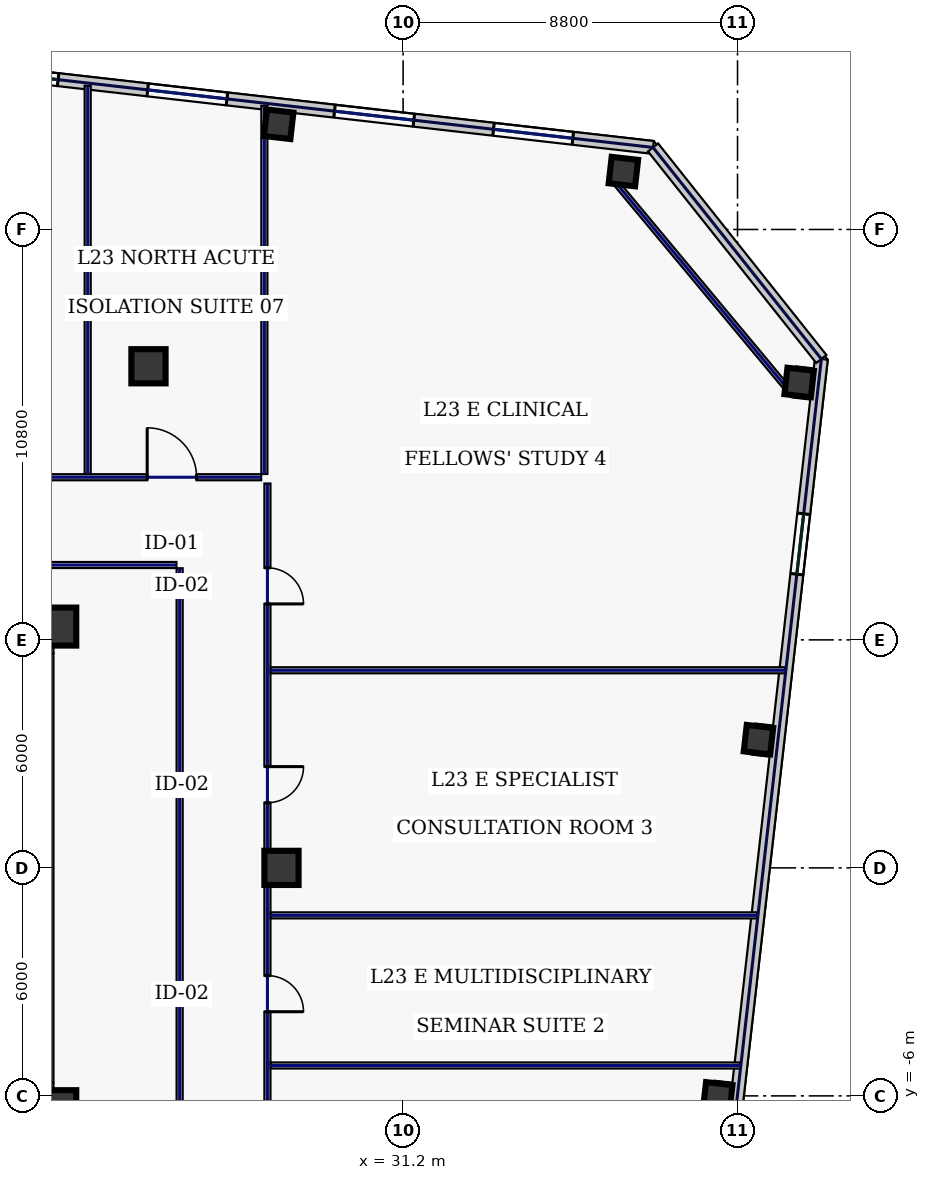
"""IFC4 building model, lengths in metres.
Left out: names, types, materials, properties, quantities, classifications, styles, units other than length and angle.
Written with IfcOpenShell. Run it as: python <this file> out.ifc"""

import sys

from ifc_helpers import new_model, si_unit, direction, frame, frame_2d, origin, origin_2d, place, context, subcontext, project, spatial, rectangle, hollow_rectangle, extrude, element, fill, save


model = new_model("IFC4")
c1 = context("Model", 3, precision=1e-05, world=origin(), true_north=direction((0.0, 1.0)))
c2 = subcontext(c1, "Body", "Model", "MODEL_VIEW")
j1 = project(units=[si_unit("LENGTHUNIT", "METRE"), si_unit("PLANEANGLEUNIT", "RADIAN")], contexts=[c1])
p1 = place(None, origin())
s1 = spatial("IfcSite", under=j1, at=p1, CompositionType="ELEMENT")
p2 = place(p1, origin())
s2 = spatial("IfcBuilding", under=s1, at=p2, CompositionType="ELEMENT")
p3 = place(p2, frame((0.0, 0.0, 105.4)))
s3 = spatial("IfcBuildingStorey", under=s2, at=p3, CompositionType="ELEMENT", Elevation=105.4)
for number, where, z_axis, x_axis in (
    (1, (10.45, 6.0, 0.0), (0.0, 0.0, 1.0), (1.0, 0.0, 0.0)),
    (2, (10.45, -6.0, 0.0), (0.0, 0.0, 1.0), (1.0, 0.0, 0.0)),
):
    element("IfcWall", number, at=place(p3, frame(where, z_axis=z_axis, x_axis=x_axis)), inside=s3, PredefinedType="SHEAR", context=c2, shape_type="SweptSolid", body=[
        extrude(rectangle(XDim=11.55, YDim=0.7, at=frame_2d((5.775, 0.0))), origin(), (0.0, 0.0, 1.0), 3.74),
    ])
p4 = place(p3, frame((21.6, -5.65, 0.0), z_axis=(0.0, 0.0, 1.0), x_axis=(0.0, 1.0, 0.0)))
e3 = element("IfcWall", 3, at=p4, inside=s3, PredefinedType="SHEAR", context=c2, shape_type="SweptSolid", body=[
    extrude(rectangle(XDim=11.3, YDim=0.8, at=frame_2d((5.65, 0.0))), origin(), (0.0, 0.0, 1.0), 3.74),
])
for number, where, z_axis, x_axis in (
    (4, (22.1, -6.35, 0.0), (0.0, 0.0, 1.0), (1.0, 0.0, 0.0)),
    (5, (22.1, 6.35, 0.0), (0.0, 0.0, 1.0), (1.0, 0.0, 0.0)),
):
    element("IfcColumn", number, at=place(p3, frame(where, z_axis=z_axis, x_axis=x_axis)), inside=s3, PredefinedType="COLUMN", context=c2, shape_type="SweptSolid", body=[
        extrude(hollow_rectangle(XDim=1.0, YDim=1.0, WallThickness=0.045, at=origin_2d()), origin(), (0.0, 0.0, 1.0), 3.74),
    ])
for number, where, z_axis, x_axis in (
    (6, (24.5, 13.2, 0.0), (0.0, 0.0, 1.0), (1.0, 0.0, 0.0)),
    (7, (28.0, 0.0, 0.0), (0.0, 0.0, 1.0), (1.0, 0.0, 0.0)),
):
    element("IfcColumn", number, at=place(p3, frame(where, z_axis=z_axis, x_axis=x_axis)), inside=s3, PredefinedType="COLUMN", context=c2, shape_type="SweptSolid", body=[
        extrude(hollow_rectangle(XDim=0.9, YDim=0.9, WallThickness=0.04, at=origin_2d()), origin(), (0.0, 0.0, 1.0), 3.74),
    ])
for number, where, z_axis, x_axis in (
    (8, (36.997, 18.323, 0.0), (0.0, 0.0, 1.0), (0.994, -0.113, 0.0)),
    (9, (27.926, 19.568, 0.0), (0.0, 0.0, 1.0), (0.994, -0.113, 0.0)),
    (10, (39.48, -6.025, 0.0), (0.0, 0.0, 1.0), (0.994, -0.113, 0.0)),
    (11, (40.551, 3.375, 0.0), (0.0, 0.0, 1.0), (0.994, -0.113, 0.0)),
    (12, (41.622, 12.774, 0.0), (0.0, 0.0, 1.0), (0.994, -0.113, 0.0)),
):
    element("IfcColumn", number, at=place(p3, frame(where, z_axis=z_axis, x_axis=x_axis)), inside=s3, PredefinedType="COLUMN", context=c2, shape_type="SweptSolid", body=[
        extrude(hollow_rectangle(XDim=0.7, YDim=0.7, WallThickness=0.032, at=origin_2d()), origin(), (0.0, 0.0, 1.0), 3.74),
    ])
p5 = place(p3, frame((37.777, 18.958, 0.0), z_axis=(0.0, 0.0, 1.0), x_axis=(-0.993571362037, 0.113207546299, 0.0)))
e13 = element("IfcWall", 13, at=p5, inside=s3, PredefinedType="STANDARD", context=c2, shape_type="SweptSolid", body=[
    extrude(rectangle(XDim=21.223, YDim=0.34, at=frame_2d((10.611, 0.0))), origin(), (0.0, 0.0, 1.0), 3.74),
])
p6 = place(p5, frame((15.756, 0.0, 0.22)))
e14 = element("IfcOpeningElement", 14, at=p6, cuts=e13, PredefinedType="OPENING", context=c2, shape_type="SweptSolid", body=[
    extrude(rectangle(XDim=1.6, YDim=1.2, at=frame_2d((0.8, 0.6))), frame((0.0, 0.18, 0.0), z_axis=(0.0, -1.0, 0.0), x_axis=(1.0, 0.0, 0.0)), (0.0, 0.0, 1.0), 0.36),
])
p7 = place(p5, frame((11.285, 0.0, 0.67)))
e15 = element("IfcOpeningElement", 15, at=p7, cuts=e13, PredefinedType="OPENING", context=c2, shape_type="SweptSolid", body=[
    extrude(rectangle(XDim=2.1, YDim=2.2, at=frame_2d((1.05, 1.1))), frame((0.0, 0.18, 0.0), z_axis=(0.0, -1.0, 0.0), x_axis=(1.0, 0.0, 0.0)), (0.0, 0.0, 1.0), 0.36),
])
p8 = place(p5, frame((6.336, 0.0, 0.67)))
e16 = element("IfcOpeningElement", 16, at=p8, cuts=e13, PredefinedType="OPENING", context=c2, shape_type="SweptSolid", body=[
    extrude(rectangle(XDim=2.1, YDim=2.2, at=frame_2d((1.05, 1.1))), frame((0.0, 0.18, 0.0), z_axis=(0.0, -1.0, 0.0), x_axis=(1.0, 0.0, 0.0)), (0.0, 0.0, 1.0), 0.36),
])
p9 = place(p5, frame((2.125, 0.0, 0.67)))
e17 = element("IfcOpeningElement", 17, at=p9, cuts=e13, PredefinedType="OPENING", context=c2, shape_type="SweptSolid", body=[
    extrude(rectangle(XDim=2.1, YDim=2.2, at=frame_2d((1.05, 1.1))), frame((0.0, 0.18, 0.0), z_axis=(0.0, -1.0, 0.0), x_axis=(1.0, 0.0, 0.0)), (0.0, 0.0, 1.0), 0.36),
])
p10 = place(p3, frame((37.768, -25.556, 0.0), z_axis=(0.0, 0.0, 1.0), x_axis=(0.113201605824, 0.993572038877, 0.0)))
e18 = element("IfcWall", 18, at=p10, inside=s3, PredefinedType="STANDARD", context=c2, shape_type="SweptSolid", body=[
    extrude(rectangle(XDim=39.2, YDim=0.34, at=frame_2d((19.6, 0.0))), origin(), (0.0, 0.0, 1.0), 3.74),
])
p11 = place(p10, frame((4.1, 0.0, 0.58)))
e19 = element("IfcOpeningElement", 19, at=p11, cuts=e18, PredefinedType="OPENING", context=c2, shape_type="SweptSolid", body=[
    extrude(rectangle(XDim=1.6, YDim=2.3, at=frame_2d((0.8, 1.15))), frame((0.0, 0.18, 0.0), z_axis=(0.0, -1.0, 0.0), x_axis=(1.0, 0.0, 0.0)), (0.0, 0.0, 1.0), 0.36),
])
p12 = place(p10, frame((13.9, 0.0, 0.58)))
e20 = element("IfcOpeningElement", 20, at=p12, cuts=e18, PredefinedType="OPENING", context=c2, shape_type="SweptSolid", body=[
    extrude(rectangle(XDim=1.6, YDim=2.3, at=frame_2d((0.8, 1.15))), frame((0.0, 0.18, 0.0), z_axis=(0.0, -1.0, 0.0), x_axis=(1.0, 0.0, 0.0)), (0.0, 0.0, 1.0), 0.36),
])
p13 = place(p10, frame((33.5, 0.0, 0.58)))
e21 = element("IfcOpeningElement", 21, at=p13, cuts=e18, PredefinedType="OPENING", context=c2, shape_type="SweptSolid", body=[
    extrude(rectangle(XDim=1.6, YDim=2.3, at=frame_2d((0.8, 1.15))), frame((0.0, 0.18, 0.0), z_axis=(0.0, -1.0, 0.0), x_axis=(1.0, 0.0, 0.0)), (0.0, 0.0, 1.0), 0.36),
])
p14 = place(p3, frame((42.206, 13.392, 0.0), z_axis=(0.0, 0.0, 1.0), x_axis=(-0.622524521309, 0.782600294128, 0.0)))
e22 = element("IfcWall", 22, at=p14, inside=s3, PredefinedType="STANDARD", context=c2, shape_type="SweptSolid", body=[
    extrude(rectangle(XDim=7.113, YDim=0.34, at=frame_2d((3.557, 0.0))), origin(), (0.0, 0.0, 1.0), 3.74),
])
p15 = place(p3, frame((41.361, 12.556, 0.0), z_axis=(0.0, 0.0, 1.0), x_axis=(-0.640217638562, 0.768193579298, 0.0)))
e23 = element("IfcWall", 23, at=p15, inside=s3, PredefinedType="PARTITIONING", context=c2, shape_type="SweptSolid", body=[
    extrude(rectangle(XDim=7.224, YDim=0.16, at=frame_2d((3.612, 0.0))), origin(), (0.0, 0.0, 1.0), 3.74),
])
p16 = place(p3, frame((-27.465, 10.28, 0.0), z_axis=(0.0, 0.0, 1.0), x_axis=(1.0, 0.0, 0.0)))
e24 = element("IfcWall", 24, at=p16, inside=s3, PredefinedType="PARTITIONING", context=c2, shape_type="SweptSolid", body=[
    extrude(rectangle(XDim=54.93, YDim=0.16, at=frame_2d((27.465, 0.0))), origin(), (0.0, 0.0, 1.0), 3.74),
])
p17 = place(p16, frame((2.044, 0.0, 0.0)))
e25 = element("IfcOpeningElement", 25, at=p17, cuts=e24, PredefinedType="OPENING", context=c2, shape_type="SweptSolid", body=[
    extrude(rectangle(XDim=0.95, YDim=2.2, at=frame_2d((0.475, 1.1))), frame((0.0, 0.09, 0.0), z_axis=(0.0, -1.0, 0.0), x_axis=(1.0, 0.0, 0.0)), (0.0, 0.0, 1.0), 0.18),
])
p18 = place(p16, frame((8.045, 0.0, 0.0)))
e26 = element("IfcOpeningElement", 26, at=p18, cuts=e24, PredefinedType="OPENING", context=c2, shape_type="SweptSolid", body=[
    extrude(rectangle(XDim=1.05, YDim=2.2, at=frame_2d((0.525, 1.1))), frame((0.0, 0.09, 0.0), z_axis=(0.0, -1.0, 0.0), x_axis=(1.0, 0.0, 0.0)), (0.0, 0.0, 1.0), 0.18),
])
p19 = place(p16, frame((16.995, 0.0, 0.0)))
e27 = element("IfcOpeningElement", 27, at=p19, cuts=e24, PredefinedType="OPENING", context=c2, shape_type="SweptSolid", body=[
    extrude(rectangle(XDim=0.95, YDim=2.2, at=frame_2d((0.475, 1.1))), frame((0.0, 0.09, 0.0), z_axis=(0.0, -1.0, 0.0), x_axis=(1.0, 0.0, 0.0)), (0.0, 0.0, 1.0), 0.18),
])
p20 = place(p16, frame((27.6, 0.0, 0.0)))
e28 = element("IfcOpeningElement", 28, at=p20, cuts=e24, PredefinedType="OPENING", context=c2, shape_type="SweptSolid", body=[
    extrude(rectangle(XDim=1.3, YDim=2.2, at=frame_2d((0.65, 1.1))), frame((0.0, 0.09, 0.0), z_axis=(0.0, -1.0, 0.0), x_axis=(1.0, 0.0, 0.0)), (0.0, 0.0, 1.0), 0.18),
])
p21 = place(p16, frame((38.575, 0.0, 0.0)))
e29 = element("IfcOpeningElement", 29, at=p21, cuts=e24, PredefinedType="OPENING", context=c2, shape_type="SweptSolid", body=[
    extrude(rectangle(XDim=0.95, YDim=2.2, at=frame_2d((0.475, 1.1))), frame((0.0, 0.09, 0.0), z_axis=(0.0, -1.0, 0.0), x_axis=(1.0, 0.0, 0.0)), (0.0, 0.0, 1.0), 0.18),
])
p22 = place(p16, frame((46.825, 0.0, 0.0)))
e30 = element("IfcOpeningElement", 30, at=p22, cuts=e24, PredefinedType="OPENING", context=c2, shape_type="SweptSolid", body=[
    extrude(rectangle(XDim=0.95, YDim=2.2, at=frame_2d((0.475, 1.1))), frame((0.0, 0.09, 0.0), z_axis=(0.0, -1.0, 0.0), x_axis=(1.0, 0.0, 0.0)), (0.0, 0.0, 1.0), 0.18),
])
p23 = place(p16, frame((51.931, 0.0, 0.0)))
e31 = element("IfcOpeningElement", 31, at=p23, cuts=e24, PredefinedType="OPENING", context=c2, shape_type="SweptSolid", body=[
    extrude(rectangle(XDim=1.3, YDim=2.2, at=frame_2d((0.65, 1.1))), frame((0.0, 0.09, 0.0), z_axis=(0.0, -1.0, 0.0), x_axis=(1.0, 0.0, 0.0)), (0.0, 0.0, 1.0), 0.18),
])
p24 = place(p3, frame((27.63, 10.115, 0.0), z_axis=(0.0, 0.0, 1.0), x_axis=(0.0, -1.0, 0.0)))
e32 = element("IfcWall", 32, at=p24, inside=s3, PredefinedType="PARTITIONING", context=c2, shape_type="SweptSolid", body=[
    extrude(rectangle(XDim=20.13, YDim=0.16, at=frame_2d((10.065, 0.0))), origin(), (0.0, 0.0, 1.0), 3.74),
])
p25 = place(p24, frame((17.181, 0.0, 0.0)))
e33 = element("IfcOpeningElement", 33, at=p25, cuts=e32, PredefinedType="OPENING", context=c2, shape_type="SweptSolid", body=[
    extrude(rectangle(XDim=0.95, YDim=2.2, at=frame_2d((0.475, 1.1))), frame((0.0, 0.09, 0.0), z_axis=(0.0, -1.0, 0.0), x_axis=(1.0, 0.0, 0.0)), (0.0, 0.0, 1.0), 0.18),
])
p26 = place(p24, frame((12.95, 0.0, 0.0)))
e34 = element("IfcOpeningElement", 34, at=p26, cuts=e32, PredefinedType="OPENING", context=c2, shape_type="SweptSolid", body=[
    extrude(rectangle(XDim=0.95, YDim=2.2, at=frame_2d((0.475, 1.1))), frame((0.0, 0.09, 0.0), z_axis=(0.0, -1.0, 0.0), x_axis=(1.0, 0.0, 0.0)), (0.0, 0.0, 1.0), 0.18),
])
p27 = place(p24, frame((7.45, 0.0, 0.0)))
e35 = element("IfcOpeningElement", 35, at=p27, cuts=e32, PredefinedType="OPENING", context=c2, shape_type="SweptSolid", body=[
    extrude(rectangle(XDim=0.95, YDim=2.2, at=frame_2d((0.475, 1.1))), frame((0.0, 0.09, 0.0), z_axis=(0.0, -1.0, 0.0), x_axis=(1.0, 0.0, 0.0)), (0.0, 0.0, 1.0), 0.18),
])
p28 = place(p24, frame((2.219, 0.0, 0.0)))
e36 = element("IfcOpeningElement", 36, at=p28, cuts=e32, PredefinedType="OPENING", context=c2, shape_type="SweptSolid", body=[
    extrude(rectangle(XDim=0.95, YDim=2.2, at=frame_2d((0.475, 1.1))), frame((0.0, 0.09, 0.0), z_axis=(0.0, -1.0, 0.0), x_axis=(1.0, 0.0, 0.0)), (0.0, 0.0, 1.0), 0.18),
])
p29 = place(p3, frame((25.235, 7.97, 0.0), z_axis=(0.0, 0.0, 1.0), x_axis=(-1.0, 0.0, 0.0)))
e37 = element("IfcWall", 37, at=p29, inside=s3, PredefinedType="PARTITIONING", context=c2, shape_type="SweptSolid", body=[
    extrude(rectangle(XDim=14.57, YDim=0.16, at=frame_2d((7.285, 0.0))), origin(), (0.0, 0.0, 1.0), 3.74),
])
p30 = place(p3, frame((25.32, -7.785, 0.0), z_axis=(0.0, 0.0, 1.0), x_axis=(0.0, 1.0, 0.0)))
e38 = element("IfcWall", 38, at=p30, inside=s3, PredefinedType="PARTITIONING", context=c2, shape_type="SweptSolid", body=[
    extrude(rectangle(XDim=15.67, YDim=0.16, at=frame_2d((7.835, 0.0))), origin(), (0.0, 0.0, 1.0), 3.74),
])
p31 = place(p3, frame((27.55, 10.365, 0.0), z_axis=(0.0, 0.0, 1.0), x_axis=(0.0, 1.0, 0.0)))
e39 = element("IfcWall", 39, at=p31, inside=s3, PredefinedType="PARTITIONING", context=c2, shape_type="SweptSolid", body=[
    extrude(rectangle(XDim=9.688, YDim=0.16, at=frame_2d((4.844, 0.0))), origin(), (0.0, 0.0, 1.0), 3.74),
])
p32 = place(p3, frame((22.9, 10.365, 0.0), z_axis=(0.0, 0.0, 1.0), x_axis=(0.0, 1.0, 0.0)))
e40 = element("IfcWall", 40, at=p32, inside=s3, PredefinedType="PARTITIONING", context=c2, shape_type="SweptSolid", body=[
    extrude(rectangle(XDim=10.218, YDim=0.16, at=frame_2d((5.109, 0.0))), origin(), (0.0, 0.0, 1.0), 3.74),
])
p33 = place(p3, frame((27.715, -5.2, 0.0), z_axis=(0.0, 0.0, 1.0), x_axis=(1.0, 0.0, 0.0)))
e41 = element("IfcWall", 41, at=p33, inside=s3, PredefinedType="PARTITIONING", context=c2, shape_type="SweptSolid", body=[
    extrude(rectangle(XDim=12.352, YDim=0.16, at=frame_2d((6.176, 0.0))), origin(), (0.0, 0.0, 1.0), 3.74),
])
p34 = place(p3, frame((27.715, -1.25, 0.0), z_axis=(0.0, 0.0, 1.0), x_axis=(1.0, 0.0, 0.0)))
e42 = element("IfcWall", 42, at=p34, inside=s3, PredefinedType="PARTITIONING", context=c2, shape_type="SweptSolid", body=[
    extrude(rectangle(XDim=12.802, YDim=0.16, at=frame_2d((6.401, 0.0))), origin(), (0.0, 0.0, 1.0), 3.74),
])
p35 = place(p3, frame((27.715, 5.2, 0.0), z_axis=(0.0, 0.0, 1.0), x_axis=(1.0, 0.0, 0.0)))
e43 = element("IfcWall", 43, at=p35, inside=s3, PredefinedType="PARTITIONING", context=c2, shape_type="SweptSolid", body=[
    extrude(rectangle(XDim=13.537, YDim=0.16, at=frame_2d((6.769, 0.0))), origin(), (0.0, 0.0, 1.0), 3.74),
])
p36 = place(p6, origin())
e44 = element("IfcWindow", 44, at=p36, inside=s3, PartitioningType="SINGLE_PANEL", PredefinedType="WINDOW", context=c2, shape_type="SweptSolid", body=[
    extrude(rectangle(XDim=1.6, YDim=1.2, at=frame_2d((0.8, 0.6))), frame((0.0, 0.03, 0.0), z_axis=(0.0, -1.0, 0.0), x_axis=(1.0, 0.0, 0.0)), (0.0, 0.0, 1.0), 0.06),
])
fill(e14, e44)
p37 = place(p7, origin())
e45 = element("IfcWindow", 45, at=p37, inside=s3, PartitioningType="SINGLE_PANEL", PredefinedType="WINDOW", context=c2, shape_type="SweptSolid", body=[
    extrude(rectangle(XDim=2.1, YDim=2.2, at=frame_2d((1.05, 1.1))), frame((0.0, 0.03, 0.0), z_axis=(0.0, -1.0, 0.0), x_axis=(1.0, 0.0, 0.0)), (0.0, 0.0, 1.0), 0.06),
])
fill(e15, e45)
p38 = place(p8, origin())
e46 = element("IfcWindow", 46, at=p38, inside=s3, PartitioningType="SINGLE_PANEL", PredefinedType="WINDOW", context=c2, shape_type="SweptSolid", body=[
    extrude(rectangle(XDim=2.1, YDim=2.2, at=frame_2d((1.05, 1.1))), frame((0.0, 0.03, 0.0), z_axis=(0.0, -1.0, 0.0), x_axis=(1.0, 0.0, 0.0)), (0.0, 0.0, 1.0), 0.06),
])
fill(e16, e46)
p39 = place(p9, origin())
e47 = element("IfcWindow", 47, at=p39, inside=s3, PartitioningType="SINGLE_PANEL", PredefinedType="WINDOW", context=c2, shape_type="SweptSolid", body=[
    extrude(rectangle(XDim=2.1, YDim=2.2, at=frame_2d((1.05, 1.1))), frame((0.0, 0.03, 0.0), z_axis=(0.0, -1.0, 0.0), x_axis=(1.0, 0.0, 0.0)), (0.0, 0.0, 1.0), 0.06),
])
fill(e17, e47)
p40 = place(p13, origin())
e48 = element("IfcWindow", 48, at=p40, inside=s3, PartitioningType="SINGLE_PANEL", PredefinedType="WINDOW", context=c2, shape_type="SweptSolid", body=[
    extrude(rectangle(XDim=1.6, YDim=2.3, at=frame_2d((0.8, 1.15))), frame((0.0, 0.03, 0.0), z_axis=(0.0, -1.0, 0.0), x_axis=(1.0, 0.0, 0.0)), (0.0, 0.0, 1.0), 0.06),
])
fill(e21, e48)
p41 = place(p23, origin())
e49 = element("IfcDoor", 49, at=p41, inside=s3, OperationType="SINGLE_SWING_LEFT", PredefinedType="DOOR", context=c2, shape_type="SweptSolid", body=[
    extrude(rectangle(XDim=1.3, YDim=2.2, at=frame_2d((0.65, 1.1))), frame((0.0, 0.025, 0.0), z_axis=(0.0, -1.0, 0.0), x_axis=(1.0, 0.0, 0.0)), (0.0, 0.0, 1.0), 0.05),
])
fill(e31, e49)
p42 = place(p26, origin())
e50 = element("IfcDoor", 50, at=p42, inside=s3, OperationType="SINGLE_SWING_RIGHT", PredefinedType="DOOR", context=c2, shape_type="SweptSolid", body=[
    extrude(rectangle(XDim=0.95, YDim=2.2, at=frame_2d((0.475, 1.1))), frame((0.0, 0.025, 0.0), z_axis=(0.0, -1.0, 0.0), x_axis=(1.0, 0.0, 0.0)), (0.0, 0.0, 1.0), 0.05),
])
fill(e34, e50)
p43 = place(p27, origin())
e51 = element("IfcDoor", 51, at=p43, inside=s3, OperationType="SINGLE_SWING_LEFT", PredefinedType="DOOR", context=c2, shape_type="SweptSolid", body=[
    extrude(rectangle(XDim=0.95, YDim=2.2, at=frame_2d((0.475, 1.1))), frame((0.0, 0.025, 0.0), z_axis=(0.0, -1.0, 0.0), x_axis=(1.0, 0.0, 0.0)), (0.0, 0.0, 1.0), 0.05),
])
fill(e35, e51)
p44 = place(p28, origin())
e52 = element("IfcDoor", 52, at=p44, inside=s3, OperationType="SINGLE_SWING_RIGHT", PredefinedType="DOOR", context=c2, shape_type="SweptSolid", body=[
    extrude(rectangle(XDim=0.95, YDim=2.2, at=frame_2d((0.475, 1.1))), frame((0.0, 0.025, 0.0), z_axis=(0.0, -1.0, 0.0), x_axis=(1.0, 0.0, 0.0)), (0.0, 0.0, 1.0), 0.05),
])
fill(e36, e52)
save(model, sys.argv[1])
